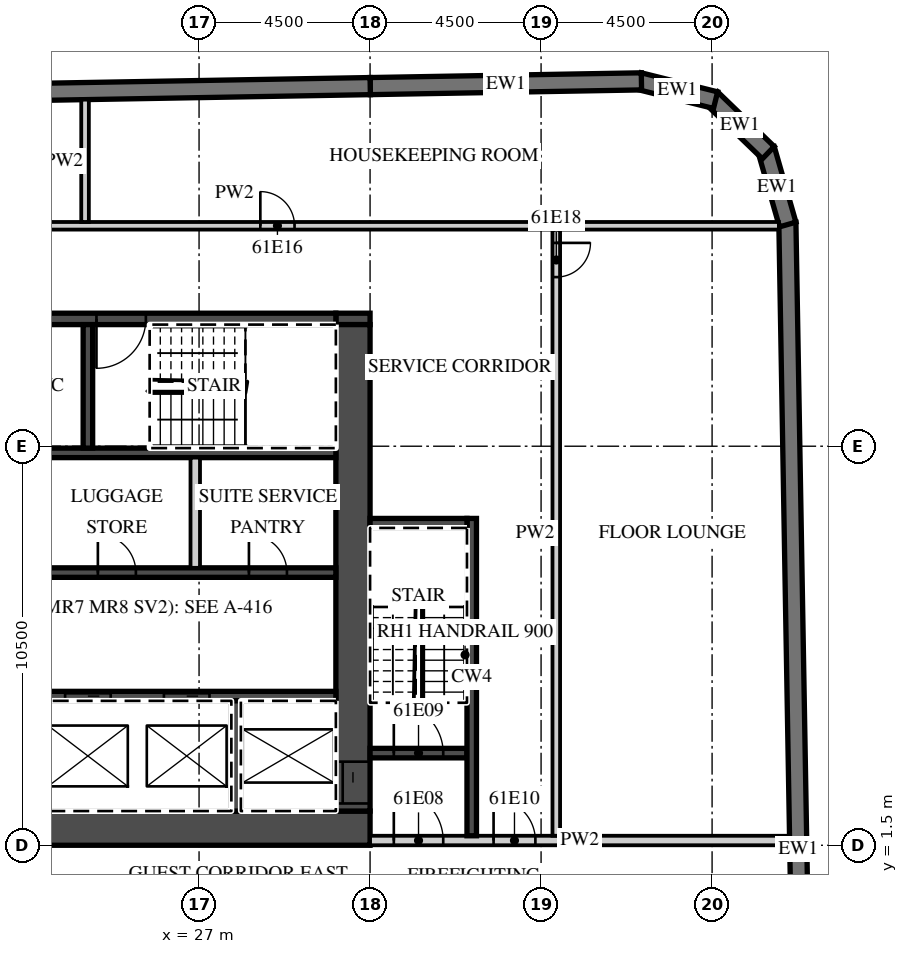
"""IFC4 building model, lengths in metres.
Left out: names, types, materials, properties, quantities, classifications, styles, units other than length and angle.
Written with IfcOpenShell. Run it as: python <this file> out.ifc"""

import sys

from ifc_helpers import new_model, si_unit, direction, frame, frame_2d, origin, place, context, subcontext, project, spatial, polyline, rectangle, outline, extrude, element, fill, save


model = new_model("IFC4")
c1 = context("Model", 3, precision=1e-05, world=origin(), true_north=direction((0.0, 1.0)))
c2 = subcontext(c1, "Body", "Model", "MODEL_VIEW")
j1 = project(units=[si_unit("LENGTHUNIT", "METRE"), si_unit("PLANEANGLEUNIT", "RADIAN")], contexts=[c1])
p1 = place(None, origin())
s1 = spatial("IfcSite", under=j1, at=p1, CompositionType="ELEMENT")
p2 = place(p1, origin())
s2 = spatial("IfcBuilding", under=s1, at=p2, CompositionType="ELEMENT")
p3 = place(p2, frame((0.0, 0.0, 247.4)))
s3 = spatial("IfcBuildingStorey", under=s2, at=p3, CompositionType="ELEMENT", Elevation=247.4)
p4 = place(p3, frame((43.057, -15.103, 0.0), z_axis=(0.0, 0.0, 1.0), x_axis=(-0.017452408953, 0.999847695112, 0.0)))
e1 = element("IfcWall", 1, at=p4, inside=s3, PredefinedType="SOLIDWALL", context=c2, shape_type="SweptSolid", body=[
    extrude(rectangle(XDim=33.0, YDim=0.45, at=frame_2d((16.5, 0.0))), origin(), (0.0, 0.0, 1.0), 3.02),
])
p5 = place(p3, frame((42.49, 17.833, 0.0), z_axis=(0.0, 0.0, 1.0), x_axis=(-0.275546368831, 0.961287781377, 0.0)))
e2 = element("IfcWall", 2, at=p5, inside=s3, PredefinedType="SOLIDWALL", context=c2, shape_type="SweptSolid", body=[
    extrude(outline(polyline([(0.0, -0.225), (2.071, -0.225), (1.95, 0.225), (0.121, 0.225), (0.0, -0.225)])), origin(), (0.0, 0.0, 1.0), 3.02),
])
p6 = place(p3, frame((41.979, 19.724, 0.0), z_axis=(0.0, 0.0, 1.0), x_axis=(-0.719379111448, 0.694617660308, 0.0)))
e3 = element("IfcWall", 3, at=p6, inside=s3, PredefinedType="SOLIDWALL", context=c2, shape_type="SweptSolid", body=[
    extrude(outline(polyline([(0.0, -0.225), (2.071, -0.225), (1.95, 0.225), (0.121, 0.225), (0.0, -0.225)])), origin(), (0.0, 0.0, 1.0), 3.02),
])
p7 = place(p3, frame((40.591, 21.106, 0.0), z_axis=(0.0, 0.0, 1.0), x_axis=(-0.970287979719, 0.241952963225, 0.0)))
e4 = element("IfcWall", 4, at=p7, inside=s3, PredefinedType="SOLIDWALL", context=c2, shape_type="SweptSolid", body=[
    extrude(outline(polyline([(0.0, -0.225), (2.071, -0.225), (1.95, 0.225), (0.121, 0.225), (0.0, -0.225)])), origin(), (0.0, 0.0, 1.0), 3.02),
])
p8 = place(p3, frame((38.641, 21.6, 0.0), z_axis=(0.0, 0.0, 1.0), x_axis=(-0.999847245074, -0.017478172627, 0.0)))
e5 = element("IfcWall", 5, at=p8, inside=s3, PredefinedType="SOLIDWALL", context=c2, shape_type="SweptSolid", body=[
    extrude(rectangle(XDim=7.138, YDim=0.45, at=frame_2d((3.569, 0.0))), origin(), (0.0, 0.0, 1.0), 3.02),
])
p9 = place(p3, frame((31.504, 21.476, 0.0), z_axis=(0.0, 0.0, 1.0), x_axis=(-0.999847677887, -0.017453395744, 0.0)))
e6 = element("IfcWall", 6, at=p9, inside=s3, PredefinedType="SOLIDWALL", context=c2, shape_type="SweptSolid", body=[
    extrude(rectangle(XDim=18.003, YDim=0.45, at=frame_2d((9.001, 0.0))), origin(), (0.0, 0.0, 1.0), 3.02),
])
p10 = place(p3, frame((13.5, 1.95, 0.0), z_axis=(0.0, 0.0, 1.0), x_axis=(1.0, 0.0, 0.0)))
e7 = element("IfcWall", 7, at=p10, inside=s3, PredefinedType="SHEAR", context=c2, shape_type="SweptSolid", body=[
    extrude(rectangle(XDim=18.0, YDim=0.9, at=frame_2d((9.0, 0.0))), origin(), (0.0, 0.0, 1.0), 3.02),
])
p11 = place(p10, frame((1.475, 0.0, 0.0)))
e8 = element("IfcOpeningElement", 8, at=p11, cuts=e7, PredefinedType="OPENING", context=c2, shape_type="SweptSolid", body=[
    extrude(rectangle(XDim=1.8, YDim=2.1, at=frame_2d((0.9, 1.05))), frame((0.0, 0.46, 0.0), z_axis=(0.0, -1.0, 0.0), x_axis=(1.0, 0.0, 0.0)), (0.0, 0.0, 1.0), 0.92),
])
p12 = place(p3, frame((30.6, 15.35, 0.0), z_axis=(0.0, 0.0, 1.0), x_axis=(1.0, 0.0, 0.0)))
e9 = element("IfcWall", 9, at=p12, inside=s3, PredefinedType="SHEAR", context=c2, shape_type="SweptSolid", body=[
    extrude(rectangle(XDim=0.9, YDim=0.3, at=frame_2d((0.45, 0.0))), origin(), (0.0, 0.0, 1.0), 3.02),
])
p13 = place(p3, frame((20.3, 15.35, 0.0), z_axis=(0.0, 0.0, 1.0), x_axis=(1.0, 0.0, 0.0)))
e10 = element("IfcWall", 10, at=p13, inside=s3, PredefinedType="SHEAR", context=c2, shape_type="SweptSolid", body=[
    extrude(rectangle(XDim=10.3, YDim=0.3, at=frame_2d((5.15, 0.0))), origin(), (0.0, 0.0, 1.0), 3.02),
])
p14 = place(p13, frame((4.0, 0.0, 0.0)))
e11 = element("IfcOpeningElement", 11, at=p14, cuts=e10, PredefinedType="OPENING", context=c2, shape_type="SweptSolid", body=[
    extrude(rectangle(XDim=1.3, YDim=2.1, at=frame_2d((0.65, 1.05))), frame((0.0, 0.16, 0.0), z_axis=(0.0, -1.0, 0.0), x_axis=(1.0, 0.0, 0.0)), (0.0, 0.0, 1.0), 0.32),
])
p15 = place(p13, frame((1.5, 0.0, 0.0)))
e12 = element("IfcOpeningElement", 12, at=p15, cuts=e10, PredefinedType="OPENING", context=c2, shape_type="SweptSolid", body=[
    extrude(rectangle(XDim=0.9, YDim=2.1, at=frame_2d((0.45, 1.05))), frame((0.0, 0.16, 0.0), z_axis=(0.0, -1.0, 0.0), x_axis=(1.0, 0.0, 0.0)), (0.0, 0.0, 1.0), 0.32),
])
p16 = place(p3, frame((31.05, 2.4, 0.0), z_axis=(0.0, 0.0, 1.0), x_axis=(0.0, 1.0, 0.0)))
e13 = element("IfcWall", 13, at=p16, inside=s3, PredefinedType="SHEAR", context=c2, shape_type="SweptSolid", body=[
    extrude(rectangle(XDim=12.8, YDim=0.9, at=frame_2d((6.4, 0.0))), origin(), (0.0, 0.0, 1.0), 3.02),
])
p17 = place(p16, frame((0.2, 0.0, 0.0)))
e14 = element("IfcOpeningElement", 14, at=p17, cuts=e13, PredefinedType="OPENING", context=c2, shape_type="SweptSolid", body=[
    extrude(rectangle(XDim=1.1, YDim=2.1, at=frame_2d((0.55, 1.05))), frame((0.0, 0.46, 0.0), z_axis=(0.0, -1.0, 0.0), x_axis=(1.0, 0.0, 0.0)), (0.0, 0.0, 1.0), 0.92),
])
p18 = place(p3, frame((17.6, 5.425, 0.0), z_axis=(0.0, 0.0, 1.0), x_axis=(1.0, 0.0, 0.0)))
e15 = element("IfcWall", 15, at=p18, inside=s3, PredefinedType="SHEAR", context=c2, shape_type="SweptSolid", body=[
    extrude(rectangle(XDim=13.0, YDim=0.25, at=frame_2d((6.5, 0.0))), origin(), (0.0, 0.0, 1.0), 3.02),
])
p19 = place(p18, frame((8.475, 0.0, 0.0)))
e16 = element("IfcOpeningElement", 16, at=p19, cuts=e15, PredefinedType="OPENING", context=c2, shape_type="SweptSolid", body=[
    extrude(rectangle(XDim=1.2, YDim=2.1, at=frame_2d((0.6, 1.05))), frame((0.0, 0.135, 0.0), z_axis=(0.0, -1.0, 0.0), x_axis=(1.0, 0.0, 0.0)), (0.0, 0.0, 1.0), 0.27),
])
p20 = place(p18, frame((5.875, 0.0, 0.0)))
e17 = element("IfcOpeningElement", 17, at=p20, cuts=e15, PredefinedType="OPENING", context=c2, shape_type="SweptSolid", body=[
    extrude(rectangle(XDim=1.2, YDim=2.1, at=frame_2d((0.6, 1.05))), frame((0.0, 0.135, 0.0), z_axis=(0.0, -1.0, 0.0), x_axis=(1.0, 0.0, 0.0)), (0.0, 0.0, 1.0), 0.27),
])
p21 = place(p3, frame((27.975, 2.4, 0.0), z_axis=(0.0, 0.0, 1.0), x_axis=(0.0, 1.0, 0.0)))
e18 = element("IfcWall", 18, at=p21, inside=s3, PredefinedType="SHEAR", context=c2, shape_type="SweptSolid", body=[
    extrude(rectangle(XDim=2.9, YDim=0.25, at=frame_2d((1.45, 0.0))), origin(), (0.0, 0.0, 1.0), 3.02),
])
p22 = place(p3, frame((14.4, 8.675, 0.0), z_axis=(0.0, 0.0, 1.0), x_axis=(1.0, 0.0, 0.0)))
e19 = element("IfcWall", 19, at=p22, inside=s3, PredefinedType="SHEAR", context=c2, shape_type="SweptSolid", body=[
    extrude(rectangle(XDim=16.2, YDim=0.25, at=frame_2d((8.1, 0.0))), origin(), (0.0, 0.0, 1.0), 3.02),
])
p23 = place(p22, frame((6.45, 0.0, 0.0)))
e20 = element("IfcOpeningElement", 20, at=p23, cuts=e19, PredefinedType="OPENING", context=c2, shape_type="SweptSolid", body=[
    extrude(rectangle(XDim=1.2, YDim=2.1, at=frame_2d((0.6, 1.05))), frame((0.0, 0.135, 0.0), z_axis=(0.0, -1.0, 0.0), x_axis=(1.0, 0.0, 0.0)), (0.0, 0.0, 1.0), 0.27),
])
p24 = place(p22, frame((3.8, 0.0, 0.0)))
e21 = element("IfcOpeningElement", 21, at=p24, cuts=e19, PredefinedType="OPENING", context=c2, shape_type="SweptSolid", body=[
    extrude(rectangle(XDim=1.2, YDim=2.1, at=frame_2d((0.6, 1.05))), frame((0.0, 0.135, 0.0), z_axis=(0.0, -1.0, 0.0), x_axis=(1.0, 0.0, 0.0)), (0.0, 0.0, 1.0), 0.27),
])
p25 = place(p22, frame((0.65, 0.0, 0.0)))
e22 = element("IfcOpeningElement", 22, at=p25, cuts=e19, PredefinedType="OPENING", context=c2, shape_type="SweptSolid", body=[
    extrude(rectangle(XDim=1.3, YDim=2.1, at=frame_2d((0.65, 1.05))), frame((0.0, 0.135, 0.0), z_axis=(0.0, -1.0, 0.0), x_axis=(1.0, 0.0, 0.0)), (0.0, 0.0, 1.0), 0.27),
])
p26 = place(p22, frame((13.913, 0.0, 0.0)))
e23 = element("IfcOpeningElement", 23, at=p26, cuts=e19, PredefinedType="OPENING", context=c2, shape_type="SweptSolid", body=[
    extrude(rectangle(XDim=1.0, YDim=2.1, at=frame_2d((0.5, 1.05))), frame((0.0, 0.135, 0.0), z_axis=(0.0, -1.0, 0.0), x_axis=(1.0, 0.0, 0.0)), (0.0, 0.0, 1.0), 0.27),
])
p27 = place(p22, frame((9.938, 0.0, 0.0)))
e24 = element("IfcOpeningElement", 24, at=p27, cuts=e19, PredefinedType="OPENING", context=c2, shape_type="SweptSolid", body=[
    extrude(rectangle(XDim=1.0, YDim=2.1, at=frame_2d((0.5, 1.05))), frame((0.0, 0.135, 0.0), z_axis=(0.0, -1.0, 0.0), x_axis=(1.0, 0.0, 0.0)), (0.0, 0.0, 1.0), 0.27),
])
p28 = place(p3, frame((17.35, 11.825, 0.0), z_axis=(0.0, 0.0, 1.0), x_axis=(1.0, 0.0, 0.0)))
e25 = element("IfcWall", 25, at=p28, inside=s3, PredefinedType="SHEAR", context=c2, shape_type="SweptSolid", body=[
    extrude(rectangle(XDim=13.25, YDim=0.25, at=frame_2d((6.625, 0.0))), origin(), (0.0, 0.0, 1.0), 3.02),
])
p29 = place(p3, frame((26.9, 8.8, 0.0), z_axis=(0.0, 0.0, 1.0), x_axis=(0.0, 1.0, 0.0)))
e26 = element("IfcWall", 26, at=p29, inside=s3, PredefinedType="PARTITIONING", context=c2, shape_type="SweptSolid", body=[
    extrude(rectangle(XDim=2.9, YDim=0.25, at=frame_2d((1.45, 0.0))), origin(), (0.0, 0.0, 1.0), 3.02),
])
p30 = place(p3, frame((24.075, 11.95, 0.0), z_axis=(0.0, 0.0, 1.0), x_axis=(0.0, 1.0, 0.0)))
e27 = element("IfcWall", 27, at=p30, inside=s3, PredefinedType="SHEAR", context=c2, shape_type="SweptSolid", body=[
    extrude(rectangle(XDim=3.25, YDim=0.25, at=frame_2d((1.625, 0.0))), origin(), (0.0, 0.0, 1.0), 3.02),
])
p31 = place(p3, frame((31.5, 1.625, 0.0), z_axis=(0.0, 0.0, 1.0), x_axis=(1.0, 0.0, 0.0)))
e28 = element("IfcWall", 28, at=p31, inside=s3, PredefinedType="PARTITIONING", context=c2, shape_type="SweptSolid", body=[
    extrude(rectangle(XDim=11.04, YDim=0.25, at=frame_2d((5.52, 0.0))), origin(), (0.0, 0.0, 1.0), 3.02),
])
p32 = place(p31, frame((0.625, 0.0, 0.0)))
e29 = element("IfcOpeningElement", 29, at=p32, cuts=e28, PredefinedType="OPENING", context=c2, shape_type="SweptSolid", body=[
    extrude(rectangle(XDim=1.3, YDim=2.1, at=frame_2d((0.65, 1.05))), frame((0.0, 0.135, 0.0), z_axis=(0.0, -1.0, 0.0), x_axis=(1.0, 0.0, 0.0)), (0.0, 0.0, 1.0), 0.27),
])
p33 = place(p31, frame((3.25, 0.0, 0.0)))
e30 = element("IfcOpeningElement", 30, at=p33, cuts=e28, PredefinedType="OPENING", context=c2, shape_type="SweptSolid", body=[
    extrude(rectangle(XDim=1.1, YDim=2.1, at=frame_2d((0.55, 1.05))), frame((0.0, 0.135, 0.0), z_axis=(0.0, -1.0, 0.0), x_axis=(1.0, 0.0, 0.0)), (0.0, 0.0, 1.0), 0.27),
])
p34 = place(p3, frame((31.5, 3.925, 0.0), z_axis=(0.0, 0.0, 1.0), x_axis=(1.0, 0.0, 0.0)))
e31 = element("IfcWall", 31, at=p34, inside=s3, PredefinedType="SHEAR", context=c2, shape_type="SweptSolid", body=[
    extrude(rectangle(XDim=2.55, YDim=0.25, at=frame_2d((1.275, 0.0))), origin(), (0.0, 0.0, 1.0), 3.02),
])
p35 = place(p34, frame((0.625, 0.0, 0.0)))
e32 = element("IfcOpeningElement", 32, at=p35, cuts=e31, PredefinedType="OPENING", context=c2, shape_type="SweptSolid", body=[
    extrude(rectangle(XDim=1.3, YDim=2.1, at=frame_2d((0.65, 1.05))), frame((0.0, 0.135, 0.0), z_axis=(0.0, -1.0, 0.0), x_axis=(1.0, 0.0, 0.0)), (0.0, 0.0, 1.0), 0.27),
])
p36 = place(p3, frame((34.175, 1.75, 0.0), z_axis=(0.0, 0.0, 1.0), x_axis=(0.0, 1.0, 0.0)))
e33 = element("IfcWall", 33, at=p36, inside=s3, PredefinedType="SHEAR", context=c2, shape_type="SweptSolid", body=[
    extrude(rectangle(XDim=8.35, YDim=0.25, at=frame_2d((4.175, 0.0))), origin(), (0.0, 0.0, 1.0), 3.02),
])
p37 = place(p3, frame((31.5, 9.975, 0.0), z_axis=(0.0, 0.0, 1.0), x_axis=(1.0, 0.0, 0.0)))
e34 = element("IfcWall", 34, at=p37, inside=s3, PredefinedType="SHEAR", context=c2, shape_type="SweptSolid", body=[
    extrude(rectangle(XDim=2.55, YDim=0.25, at=frame_2d((1.275, 0.0))), origin(), (0.0, 0.0, 1.0), 3.02),
])
p38 = place(p3, frame((36.4, 1.75, 0.0), z_axis=(0.0, 0.0, 1.0), x_axis=(0.0, 1.0, 0.0)))
e35 = element("IfcWall", 35, at=p38, inside=s3, PredefinedType="PARTITIONING", context=c2, shape_type="SweptSolid", body=[
    extrude(rectangle(XDim=15.95, YDim=0.2, at=frame_2d((7.975, 0.0))), origin(), (0.0, 0.0, 1.0), 3.02),
])
p39 = place(p38, frame((14.7, 0.0, 0.0)))
e36 = element("IfcOpeningElement", 36, at=p39, cuts=e35, PredefinedType="OPENING", context=c2, shape_type="SweptSolid", body=[
    extrude(rectangle(XDim=0.9, YDim=2.1, at=frame_2d((0.45, 1.05))), frame((0.0, 0.11, 0.0), z_axis=(0.0, -1.0, 0.0), x_axis=(1.0, 0.0, 0.0)), (0.0, 0.0, 1.0), 0.22),
])
p40 = place(p3, frame((13.6, 17.8, 0.0), z_axis=(0.0, 0.0, 1.0), x_axis=(1.0, 0.0, 0.0)))
e37 = element("IfcWall", 37, at=p40, inside=s3, PredefinedType="PARTITIONING", context=c2, shape_type="SweptSolid", body=[
    extrude(rectangle(XDim=28.657, YDim=0.2, at=frame_2d((14.329, 0.0))), origin(), (0.0, 0.0, 1.0), 3.02),
])
p41 = place(p40, frame((15.012, 0.0, 0.0)))
e38 = element("IfcOpeningElement", 38, at=p41, cuts=e37, PredefinedType="OPENING", context=c2, shape_type="SweptSolid", body=[
    extrude(rectangle(XDim=0.9, YDim=2.1, at=frame_2d((0.45, 1.05))), frame((0.0, 0.11, 0.0), z_axis=(0.0, -1.0, 0.0), x_axis=(1.0, 0.0, 0.0)), (0.0, 0.0, 1.0), 0.22),
])
p42 = place(p40, frame((6.712, 0.0, 0.0)))
e39 = element("IfcOpeningElement", 39, at=p42, cuts=e37, PredefinedType="OPENING", context=c2, shape_type="SweptSolid", body=[
    extrude(rectangle(XDim=0.9, YDim=2.1, at=frame_2d((0.45, 1.05))), frame((0.0, 0.11, 0.0), z_axis=(0.0, -1.0, 0.0), x_axis=(1.0, 0.0, 0.0)), (0.0, 0.0, 1.0), 0.22),
])
p43 = place(p3, frame((24.0, 17.9, 0.0), z_axis=(0.0, 0.0, 1.0), x_axis=(0.0, 1.0, 0.0)))
e40 = element("IfcWall", 40, at=p43, inside=s3, PredefinedType="PARTITIONING", context=c2, shape_type="SweptSolid", body=[
    extrude(rectangle(XDim=3.22, YDim=0.2, at=frame_2d((1.61, 0.0))), origin(), (0.0, 0.0, 1.0), 3.02),
])
p44 = place(p19, origin())
e41 = element("IfcDoor", 41, at=p44, inside=s3, OperationType="SLIDING_TO_LEFT", PredefinedType="DOOR", context=c2, shape_type="SweptSolid", body=[
    extrude(rectangle(XDim=1.2, YDim=2.1, at=frame_2d((0.6, 1.05))), frame((0.0, 0.025, 0.0), z_axis=(0.0, -1.0, 0.0), x_axis=(1.0, 0.0, 0.0)), (0.0, 0.0, 1.0), 0.05),
])
fill(e16, e41)
p45 = place(p20, origin())
e42 = element("IfcDoor", 42, at=p45, inside=s3, OperationType="SLIDING_TO_RIGHT", PredefinedType="DOOR", context=c2, shape_type="SweptSolid", body=[
    extrude(rectangle(XDim=1.2, YDim=2.1, at=frame_2d((0.6, 1.05))), frame((0.0, 0.025, 0.0), z_axis=(0.0, -1.0, 0.0), x_axis=(1.0, 0.0, 0.0)), (0.0, 0.0, 1.0), 0.05),
])
fill(e17, e42)
p46 = place(p17, origin())
e43 = element("IfcDoor", 43, at=p46, inside=s3, OperationType="SLIDING_TO_LEFT", PredefinedType="DOOR", context=c2, shape_type="SweptSolid", body=[
    extrude(rectangle(XDim=1.1, YDim=2.1, at=frame_2d((0.55, 1.05))), frame((0.0, 0.025, 0.0), z_axis=(0.0, -1.0, 0.0), x_axis=(1.0, 0.0, 0.0)), (0.0, 0.0, 1.0), 0.05),
])
fill(e14, e43)
p47 = place(p32, origin())
e44 = element("IfcDoor", 44, at=p47, inside=s3, OperationType="SINGLE_SWING_LEFT", PredefinedType="DOOR", context=c2, shape_type="SweptSolid", body=[
    extrude(rectangle(XDim=1.3, YDim=2.1, at=frame_2d((0.65, 1.05))), frame((0.0, 0.025, 0.0), z_axis=(0.0, -1.0, 0.0), x_axis=(1.0, 0.0, 0.0)), (0.0, 0.0, 1.0), 0.05),
])
fill(e29, e44)
p48 = place(p35, origin())
e45 = element("IfcDoor", 45, at=p48, inside=s3, OperationType="SINGLE_SWING_LEFT", PredefinedType="DOOR", context=c2, shape_type="SweptSolid", body=[
    extrude(rectangle(XDim=1.3, YDim=2.1, at=frame_2d((0.65, 1.05))), frame((0.0, 0.025, 0.0), z_axis=(0.0, -1.0, 0.0), x_axis=(1.0, 0.0, 0.0)), (0.0, 0.0, 1.0), 0.05),
])
fill(e32, e45)
p49 = place(p33, origin())
e46 = element("IfcDoor", 46, at=p49, inside=s3, OperationType="SINGLE_SWING_LEFT", PredefinedType="DOOR", context=c2, shape_type="SweptSolid", body=[
    extrude(rectangle(XDim=1.1, YDim=2.1, at=frame_2d((0.55, 1.05))), frame((0.0, 0.025, 0.0), z_axis=(0.0, -1.0, 0.0), x_axis=(1.0, 0.0, 0.0)), (0.0, 0.0, 1.0), 0.05),
])
fill(e30, e46)
p50 = place(p14, origin())
e47 = element("IfcDoor", 47, at=p50, inside=s3, OperationType="SINGLE_SWING_LEFT", PredefinedType="DOOR", context=c2, shape_type="SweptSolid", body=[
    extrude(rectangle(XDim=1.3, YDim=2.1, at=frame_2d((0.65, 1.05))), frame((0.0, 0.025, 0.0), z_axis=(0.0, -1.0, 0.0), x_axis=(1.0, 0.0, 0.0)), (0.0, 0.0, 1.0), 0.05),
])
fill(e11, e47)
p51 = place(p26, origin())
e48 = element("IfcDoor", 48, at=p51, inside=s3, OperationType="SINGLE_SWING_LEFT", PredefinedType="DOOR", context=c2, shape_type="SweptSolid", body=[
    extrude(rectangle(XDim=1.0, YDim=2.1, at=frame_2d((0.5, 1.05))), frame((0.0, 0.025, 0.0), z_axis=(0.0, -1.0, 0.0), x_axis=(1.0, 0.0, 0.0)), (0.0, 0.0, 1.0), 0.05),
])
fill(e23, e48)
p52 = place(p27, origin())
e49 = element("IfcDoor", 49, at=p52, inside=s3, OperationType="SINGLE_SWING_LEFT", PredefinedType="DOOR", context=c2, shape_type="SweptSolid", body=[
    extrude(rectangle(XDim=1.0, YDim=2.1, at=frame_2d((0.5, 1.05))), frame((0.0, 0.025, 0.0), z_axis=(0.0, -1.0, 0.0), x_axis=(1.0, 0.0, 0.0)), (0.0, 0.0, 1.0), 0.05),
])
fill(e24, e49)
p53 = place(p41, origin())
e50 = element("IfcDoor", 50, at=p53, inside=s3, OperationType="SINGLE_SWING_LEFT", PredefinedType="DOOR", context=c2, shape_type="SweptSolid", body=[
    extrude(rectangle(XDim=0.9, YDim=2.1, at=frame_2d((0.45, 1.05))), frame((0.0, 0.025, 0.0), z_axis=(0.0, -1.0, 0.0), x_axis=(1.0, 0.0, 0.0)), (0.0, 0.0, 1.0), 0.05),
])
fill(e38, e50)
p54 = place(p39, origin())
e51 = element("IfcDoor", 51, at=p54, inside=s3, OperationType="SINGLE_SWING_RIGHT", PredefinedType="DOOR", context=c2, shape_type="SweptSolid", body=[
    extrude(rectangle(XDim=0.9, YDim=2.1, at=frame_2d((0.45, 1.05))), frame((0.0, 0.025, 0.0), z_axis=(0.0, -1.0, 0.0), x_axis=(1.0, 0.0, 0.0)), (0.0, 0.0, 1.0), 0.05),
])
fill(e36, e51)
save(model, sys.argv[1])
